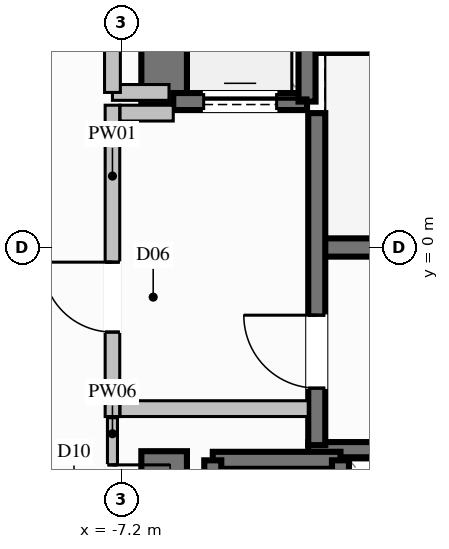
"""IFC4 building model, lengths in metres.
Left out: names, types, materials, properties, quantities, classifications, styles, units other than length and angle.
Written with IfcOpenShell. Run it as: python <this file> out.ifc"""

import sys

from ifc_helpers import new_model, si_unit, direction, frame, frame_2d, origin, place, context, subcontext, project, spatial, rectangle, extrude, element, fill, save


model = new_model("IFC4")
c1 = context("Model", 3, precision=1e-05, world=origin(), true_north=direction((0.0, 1.0)))
c2 = subcontext(c1, "Body", "Model", "MODEL_VIEW")
j1 = project(units=[si_unit("LENGTHUNIT", "METRE"), si_unit("PLANEANGLEUNIT", "RADIAN")], contexts=[c1])
p1 = place(None, origin())
s1 = spatial("IfcSite", under=j1, at=p1, CompositionType="ELEMENT")
p2 = place(p1, origin())
s2 = spatial("IfcBuilding", under=s1, at=p2, CompositionType="ELEMENT")
p3 = place(p2, frame((0.0, 0.0, 39.2)))
s3 = spatial("IfcBuildingStorey", under=s2, at=p3, CompositionType="ELEMENT", Elevation=39.2)
p4 = place(p3, frame((-3.99, 0.0, 0.0), z_axis=(0.0, 0.0, 1.0), x_axis=(1.0, 0.0, 0.0)))
e1 = element("IfcWall", 1, at=p4, inside=s3, PredefinedType="SHEAR", context=c2, shape_type="SweptSolid", body=[
    extrude(rectangle(XDim=7.98, YDim=0.3, at=frame_2d((3.99, 0.0))), origin(), (0.0, 0.0, 1.0), 3.6),
])
for number, where, z_axis, x_axis in (
    (2, (-4.13, -3.325, 0.0), (0.0, 0.0, 1.0), (1.0, 0.0, 0.0)),
    (3, (-4.13, 3.325, 0.0), (0.0, 0.0, 1.0), (1.0, 0.0, 0.0)),
):
    element("IfcWall", number, at=place(p3, frame(where, z_axis=z_axis, x_axis=x_axis)), inside=s3, PredefinedType="SOLIDWALL", context=c2, shape_type="SweptSolid", body=[
        extrude(rectangle(XDim=8.26, YDim=0.25, at=frame_2d((4.13, 0.0))), origin(), (0.0, 0.0, 1.0), 3.6),
    ])
p5 = place(p3, frame((-6.5, 2.35, 0.0), z_axis=(0.0, 0.0, 1.0), x_axis=(0.0, 1.0, 0.0)))
e4 = element("IfcWall", 4, at=p5, inside=s3, PredefinedType="SHEAR", context=c2, shape_type="SweptSolid", body=[
    extrude(rectangle(XDim=4.125, YDim=0.75, at=frame_2d((2.062, 0.0))), origin(), (0.0, 0.0, 1.0), 3.6),
])
p6 = place(p3, frame((-6.5, -6.475, 0.0), z_axis=(0.0, 0.0, 1.0), x_axis=(0.0, 1.0, 0.0)))
e5 = element("IfcWall", 5, at=p6, inside=s3, PredefinedType="SHEAR", context=c2, shape_type="SweptSolid", body=[
    extrude(rectangle(XDim=3.125, YDim=0.75, at=frame_2d((1.562, 0.0))), origin(), (0.0, 0.0, 1.0), 3.6),
])
p7 = place(p3, frame((-3.6, -3.5, 0.0), z_axis=(0.0, 0.0, 1.0), x_axis=(-1.0, 0.0, 0.0)))
e6 = element("IfcWall", 6, at=p7, inside=s3, PredefinedType="SOLIDWALL", context=c2, shape_type="SweptSolid", body=[
    extrude(rectangle(XDim=2.1, YDim=0.28, at=frame_2d((1.05, 0.0))), origin(), (0.0, 0.0, 1.0), 3.34),
])
for number, where, z_axis, x_axis in (
    (7, (-5.7, -3.5, 0.0), (0.0, 0.0, 1.0), (0.0, -1.0, 0.0)),
    (8, (-3.6, -6.0, 0.0), (0.0, 0.0, 1.0), (0.0, 1.0, 0.0)),
):
    element("IfcWall", number, at=place(p3, frame(where, z_axis=z_axis, x_axis=x_axis)), inside=s3, PredefinedType="SOLIDWALL", context=c2, shape_type="SweptSolid", body=[
        extrude(rectangle(XDim=2.5, YDim=0.28, at=frame_2d((1.25, 0.0))), origin(), (0.0, 0.0, 1.0), 3.34),
    ])
p8 = place(p3, frame((-6.35, 2.4, 0.0), z_axis=(0.0, 0.0, 1.0), x_axis=(1.0, 0.0, 0.0)))
e9 = element("IfcWall", 9, at=p8, inside=s3, PredefinedType="SOLIDWALL", context=c2, shape_type="SweptSolid", body=[
    extrude(rectangle(XDim=2.2, YDim=0.28, at=frame_2d((1.1, 0.0))), origin(), (0.0, 0.0, 1.0), 3.34),
])
p9 = place(p8, frame((0.5, 0.0, 0.0)))
e10 = element("IfcOpeningElement", 10, at=p9, cuts=e9, PredefinedType="OPENING", context=c2, shape_type="SweptSolid", body=[
    extrude(rectangle(XDim=1.2, YDim=2.2, at=frame_2d((0.6, 1.1))), frame((0.0, 0.15, 0.0), z_axis=(0.0, -1.0, 0.0), x_axis=(1.0, 0.0, 0.0)), (0.0, 0.0, 1.0), 0.3),
])
p10 = place(p3, frame((-4.15, 2.4, 0.0), z_axis=(0.0, 0.0, 1.0), x_axis=(0.0, 1.0, 0.0)))
e11 = element("IfcWall", 11, at=p10, inside=s3, PredefinedType="SOLIDWALL", context=c2, shape_type="SweptSolid", body=[
    extrude(rectangle(XDim=2.7, YDim=0.28, at=frame_2d((1.35, 0.0))), origin(), (0.0, 0.0, 1.0), 3.34),
])
p11 = place(p3, frame((-3.99, -3.25, 0.0), z_axis=(0.0, 0.0, 1.0), x_axis=(0.0, 1.0, 0.0)))
e12 = element("IfcWall", 12, at=p11, inside=s3, PredefinedType="SOLIDWALL", context=c2, shape_type="SweptSolid", body=[
    extrude(rectangle(XDim=5.46, YDim=0.28, at=frame_2d((2.73, 0.0))), origin(), (0.0, 0.0, 1.0), 3.34),
])
p12 = place(p11, frame((0.937, 0.0, 0.0)))
e13 = element("IfcOpeningElement", 13, at=p12, cuts=e12, PredefinedType="OPENING", context=c2, shape_type="SweptSolid", body=[
    extrude(rectangle(XDim=1.2, YDim=2.2, at=frame_2d((0.6, 1.1))), frame((0.0, 0.15, 0.0), z_axis=(0.0, -1.0, 0.0), x_axis=(1.0, 0.0, 0.0)), (0.0, 0.0, 1.0), 0.3),
])
p13 = place(p3, frame((-7.35, -2.78, 0.0), z_axis=(0.0, 0.0, 1.0), x_axis=(0.0, 1.0, 0.0)))
e14 = element("IfcWall", 14, at=p13, inside=s3, PredefinedType="PARTITIONING", context=c2, shape_type="SweptSolid", body=[
    extrude(rectangle(XDim=5.12, YDim=0.24, at=frame_2d((2.56, 0.0))), origin(), (0.0, 0.0, 1.0), 2.425),
])
p14 = place(p13, frame((1.389, 0.0, 0.0)))
e15 = element("IfcOpeningElement", 15, at=p14, cuts=e14, PredefinedType="OPENING", context=c2, shape_type="SweptSolid", body=[
    extrude(rectangle(XDim=1.15, YDim=2.2, at=frame_2d((0.575, 1.1))), frame((0.0, 0.13, 0.0), z_axis=(0.0, -1.0, 0.0), x_axis=(1.0, 0.0, 0.0)), (0.0, 0.0, 1.0), 0.26),
])
p15 = place(p3, frame((-7.225, -2.65, 0.0), z_axis=(0.0, 0.0, 1.0), x_axis=(1.0, 0.0, 0.0)))
e16 = element("IfcWall", 16, at=p15, inside=s3, PredefinedType="PARTITIONING", context=c2, shape_type="SweptSolid", body=[
    extrude(rectangle(XDim=3.095, YDim=0.26, at=frame_2d((1.548, 0.0))), origin(), (0.0, 0.0, 1.0), 3.34),
])
p16 = place(p3, frame((-7.225, 2.21, 0.0), z_axis=(0.0, 0.0, 1.0), x_axis=(1.0, 0.0, 0.0)))
e17 = element("IfcWall", 17, at=p16, inside=s3, PredefinedType="PARTITIONING", context=c2, shape_type="SweptSolid", body=[
    extrude(rectangle(XDim=0.875, YDim=0.26, at=frame_2d((0.438, 0.0))), origin(), (0.0, 0.0, 1.0), 3.34),
])
p17 = place(p3, frame((-7.35, 2.55, 0.0), z_axis=(0.0, 0.0, 1.0), x_axis=(1.0, 0.0, 0.0)))
e18 = element("IfcWall", 18, at=p17, inside=s3, PredefinedType="PARTITIONING", context=c2, shape_type="SweptSolid", body=[
    extrude(rectangle(XDim=0.93, YDim=0.26, at=frame_2d((0.465, 0.0))), origin(), (0.0, 0.0, 1.0), 3.34),
])
p18 = place(p3, frame((-7.35, 2.55, 0.0), z_axis=(0.0, 0.0, 1.0), x_axis=(0.0, 1.0, 0.0)))
e19 = element("IfcWall", 19, at=p18, inside=s3, PredefinedType="PARTITIONING", context=c2, shape_type="SweptSolid", body=[
    extrude(rectangle(XDim=2.4, YDim=0.26, at=frame_2d((1.2, 0.0))), origin(), (0.0, 0.0, 1.0), 2.425),
])
p19 = place(p18, frame((0.775, 0.0, 0.0)))
e20 = element("IfcOpeningElement", 20, at=p19, cuts=e19, PredefinedType="OPENING", context=c2, shape_type="SweptSolid", body=[
    extrude(rectangle(XDim=0.85, YDim=2.05, at=frame_2d((0.425, 1.025))), frame((0.0, 0.14, 0.0), z_axis=(0.0, -1.0, 0.0), x_axis=(1.0, 0.0, 0.0)), (0.0, 0.0, 1.0), 0.28),
])
p20 = place(p3, frame((-7.35, -2.8, 0.0), z_axis=(0.0, 0.0, 1.0), x_axis=(0.0, -1.0, 0.0)))
e21 = element("IfcWall", 21, at=p20, inside=s3, PredefinedType="PARTITIONING", context=c2, shape_type="SweptSolid", body=[
    extrude(rectangle(XDim=2.5, YDim=0.165, at=frame_2d((1.25, 0.0))), origin(), (0.0, 0.0, 1.0), 3.34),
])
p21 = place(p20, frame((0.775, 0.0, 0.0)))
e22 = element("IfcOpeningElement", 22, at=p21, cuts=e21, PredefinedType="OPENING", context=c2, shape_type="SweptSolid", body=[
    extrude(rectangle(XDim=0.95, YDim=2.1, at=frame_2d((0.475, 1.05))), frame((0.0, 0.093, 0.0), z_axis=(0.0, -1.0, 0.0), x_axis=(1.0, 0.0, 0.0)), (0.0, 0.0, 1.0), 0.185),
])
p22 = place(p9, origin())
e23 = element("IfcDoor", 23, at=p22, inside=s3, OperationType="SLIDING_TO_LEFT", PredefinedType="DOOR", context=c2, shape_type="SweptSolid", body=[
    extrude(rectangle(XDim=1.2, YDim=2.2, at=frame_2d((0.6, 1.1))), frame((0.0, 0.025, 0.0), z_axis=(0.0, -1.0, 0.0), x_axis=(1.0, 0.0, 0.0)), (0.0, 0.0, 1.0), 0.05),
])
fill(e10, e23)
p23 = place(p12, origin())
e24 = element("IfcDoor", 24, at=p23, inside=s3, OperationType="SINGLE_SWING_RIGHT", PredefinedType="DOOR", context=c2, shape_type="SweptSolid", body=[
    extrude(rectangle(XDim=1.2, YDim=2.2, at=frame_2d((0.6, 1.1))), frame((0.0, 0.025, 0.0), z_axis=(0.0, -1.0, 0.0), x_axis=(1.0, 0.0, 0.0)), (0.0, 0.0, 1.0), 0.05),
])
fill(e13, e24)
p24 = place(p14, origin())
e25 = element("IfcDoor", 25, at=p24, inside=s3, OperationType="SINGLE_SWING_RIGHT", PredefinedType="DOOR", context=c2, shape_type="SweptSolid", body=[
    extrude(rectangle(XDim=1.15, YDim=2.2, at=frame_2d((0.575, 1.1))), frame((0.0, 0.025, 0.0), z_axis=(0.0, -1.0, 0.0), x_axis=(1.0, 0.0, 0.0)), (0.0, 0.0, 1.0), 0.05),
])
fill(e15, e25)
p25 = place(p21, origin())
e26 = element("IfcDoor", 26, at=p25, inside=s3, OperationType="SINGLE_SWING_LEFT", PredefinedType="DOOR", context=c2, shape_type="SweptSolid", body=[
    extrude(rectangle(XDim=0.95, YDim=2.1, at=frame_2d((0.475, 1.05))), frame((0.0, 0.025, 0.0), z_axis=(0.0, -1.0, 0.0), x_axis=(1.0, 0.0, 0.0)), (0.0, 0.0, 1.0), 0.05),
])
fill(e22, e26)
save(model, sys.argv[1])
